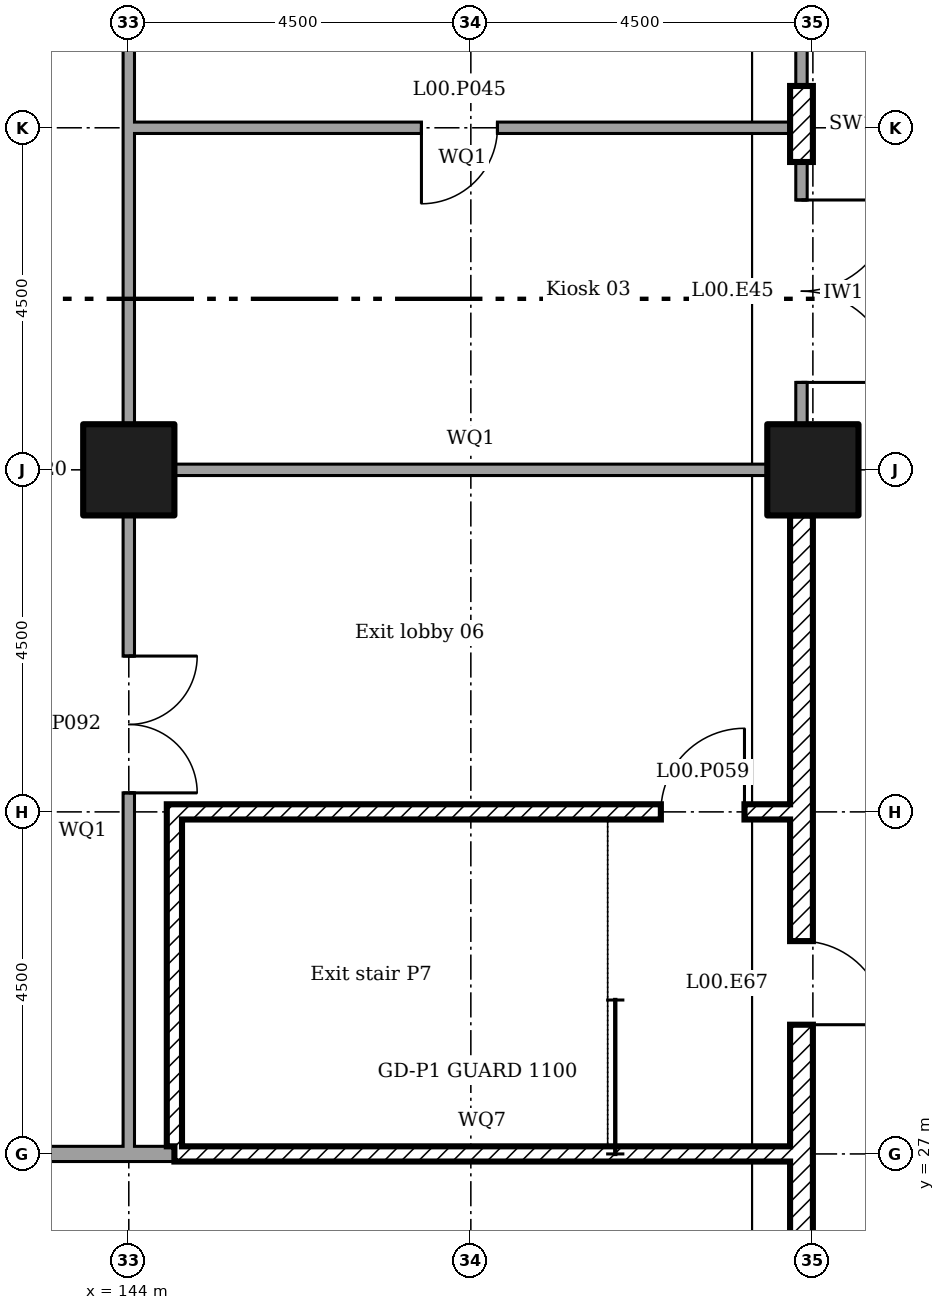
"""IFC4 building model, lengths in metres.
Left out: names, types, materials, properties, quantities, classifications, styles, units other than length and angle.
Written with IfcOpenShell. Run it as: python <this file> out.ifc"""

import sys

from ifc_helpers import new_model, si_unit, direction, frame, frame_2d, origin, origin_2d, place, context, subcontext, project, spatial, rectangle, extrude, element, fill, save


model = new_model("IFC4")
c1 = context("Model", 3, precision=1e-05, world=origin(), true_north=direction((0.0, 1.0)))
c2 = subcontext(c1, "Body", "Model", "MODEL_VIEW")
j1 = project(units=[si_unit("LENGTHUNIT", "METRE"), si_unit("PLANEANGLEUNIT", "RADIAN")], contexts=[c1])
p1 = place(None, origin())
s1 = spatial("IfcSite", under=j1, at=p1, CompositionType="ELEMENT")
p2 = place(p1, origin())
s2 = spatial("IfcBuilding", under=s1, at=p2, CompositionType="ELEMENT")
p3 = place(p2, origin())
s3 = spatial("IfcBuildingStorey", under=s2, at=p3, CompositionType="ELEMENT", Elevation=0.0)
for number, where in (
    (1, (144.0, 36.0, 0.0)),
    (2, (153.0, 36.0, 0.0)),
):
    element("IfcColumn", number, at=place(p3, frame(where)), inside=s3, PredefinedType="COLUMN", context=c2, shape_type="SweptSolid", body=[
        extrude(rectangle(XDim=1.2, YDim=1.2, at=origin_2d()), origin(), (0.0, 0.0, 1.0), 6.0),
    ])
p4 = place(p3, frame((152.85, 23.1, 0.0), z_axis=(0.0, 0.0, 1.0), x_axis=(0.0, 1.0, 0.0)))
e3 = element("IfcWall", 3, at=p4, inside=s3, PredefinedType="ELEMENTEDWALL", context=c2, shape_type="SweptSolid", body=[
    extrude(rectangle(XDim=5.1, YDim=0.3, at=frame_2d((2.55, 0.0))), origin(), (0.0, 0.0, 1.0), 5.55),
])
p5 = place(p3, frame((152.85, 28.2, 0.0), z_axis=(0.0, 0.0, 1.0), x_axis=(0.0, 1.0, 0.0)))
e4 = element("IfcWall", 4, at=p5, inside=s3, PredefinedType="ELEMENTEDWALL", context=c2, shape_type="SweptSolid", body=[
    extrude(rectangle(XDim=2.1, YDim=0.3, at=frame_2d((1.05, 0.0))), origin(), (0.0, 0.0, 1.0), 5.55),
])
p6 = place(p5, frame((0.5, 0.0, 0.0)))
e5 = element("IfcOpeningElement", 5, at=p6, cuts=e4, PredefinedType="OPENING", context=c2, shape_type="SweptSolid", body=[
    extrude(rectangle(XDim=1.1, YDim=2.4, at=frame_2d((0.55, 1.2))), frame((0.0, 0.16, 0.0), z_axis=(0.0, -1.0, 0.0), x_axis=(1.0, 0.0, 0.0)), (0.0, 0.0, 1.0), 0.32),
])
p7 = place(p3, frame((152.85, 30.3, 0.0), z_axis=(0.0, 0.0, 1.0), x_axis=(0.0, 1.0, 0.0)))
e6 = element("IfcWall", 6, at=p7, inside=s3, PredefinedType="ELEMENTEDWALL", context=c2, shape_type="SweptSolid", body=[
    extrude(rectangle(XDim=5.1, YDim=0.3, at=frame_2d((2.55, 0.0))), origin(), (0.0, 0.0, 1.0), 5.55),
])
p8 = place(p3, frame((152.85, 36.6, 0.0), z_axis=(0.0, 0.0, 1.0), x_axis=(0.0, 1.0, 0.0)))
e7 = element("IfcWall", 7, at=p8, inside=s3, PredefinedType="SOLIDWALL", context=c2, shape_type="SweptSolid", body=[
    extrude(rectangle(XDim=3.45, YDim=0.15, at=frame_2d((1.725, 0.0))), origin(), (0.0, 0.0, 1.0), 5.55),
])
p9 = place(p8, frame((0.55, 0.0, 0.0)))
e8 = element("IfcOpeningElement", 8, at=p9, cuts=e7, PredefinedType="OPENING", context=c2, shape_type="SweptSolid", body=[
    extrude(rectangle(XDim=2.4, YDim=2.7, at=frame_2d((1.2, 1.35))), frame((0.0, 0.085, 0.0), z_axis=(0.0, -1.0, 0.0), x_axis=(1.0, 0.0, 0.0)), (0.0, 0.0, 1.0), 0.17),
])
p10 = place(p3, frame((152.85, 40.05, 0.0), z_axis=(0.0, 0.0, 1.0), x_axis=(0.0, 1.0, 0.0)))
e9 = element("IfcWall", 9, at=p10, inside=s3, PredefinedType="ELEMENTEDWALL", context=c2, shape_type="SweptSolid", body=[
    extrude(rectangle(XDim=1.0, YDim=0.3, at=frame_2d((0.5, 0.0))), origin(), (0.0, 0.0, 1.0), 5.55),
])
p11 = place(p3, frame((152.85, 41.05, 0.0), z_axis=(0.0, 0.0, 1.0), x_axis=(0.0, 1.0, 0.0)))
e10 = element("IfcWall", 10, at=p11, inside=s3, PredefinedType="SOLIDWALL", context=c2, shape_type="SweptSolid", body=[
    extrude(rectangle(XDim=3.4, YDim=0.15, at=frame_2d((1.7, 0.0))), origin(), (0.0, 0.0, 1.0), 5.55),
])
p12 = place(p11, frame((0.5, 0.0, 0.0)))
e11 = element("IfcOpeningElement", 11, at=p12, cuts=e10, PredefinedType="OPENING", context=c2, shape_type="SweptSolid", body=[
    extrude(rectangle(XDim=2.4, YDim=2.7, at=frame_2d((1.2, 1.35))), frame((0.0, 0.085, 0.0), z_axis=(0.0, -1.0, 0.0), x_axis=(1.0, 0.0, 0.0)), (0.0, 0.0, 1.0), 0.17),
])
p13 = place(p3, frame((139.5, 27.0, 0.0)))
e12 = element("IfcWall", 12, at=p13, inside=s3, PredefinedType="SOLIDWALL", context=c2, shape_type="SweptSolid", body=[
    extrude(rectangle(XDim=4.575, YDim=0.2, at=frame_2d((2.288, 0.0))), origin(), (0.0, 0.0, 1.0), 5.55),
])
p14 = place(p3, frame((144.0, 27.0, 0.0)))
e13 = element("IfcWall", 13, at=p14, inside=s3, PredefinedType="SOLIDWALL", context=c2, shape_type="SweptSolid", body=[
    extrude(rectangle(XDim=0.7, YDim=0.2, at=frame_2d((0.35, 0.0))), origin(), (0.0, 0.0, 1.0), 5.55),
])
p15 = place(p3, frame((144.6, 27.0, 0.0)))
e14 = element("IfcWall", 14, at=p15, inside=s3, PredefinedType="SOLIDWALL", context=c2, shape_type="SweptSolid", body=[
    extrude(rectangle(XDim=8.1, YDim=0.2, at=frame_2d((4.05, 0.0))), origin(), (0.0, 0.0, 1.0), 5.55),
])
p16 = place(p3, frame((144.0, 27.1, 0.0), z_axis=(0.0, 0.0, 1.0), x_axis=(0.0, 1.0, 0.0)))
e15 = element("IfcWall", 15, at=p16, inside=s3, PredefinedType="PARTITIONING", context=c2, shape_type="SweptSolid", body=[
    extrude(rectangle(XDim=8.305, YDim=0.15, at=frame_2d((4.152, 0.0))), origin(), (0.0, 0.0, 1.0), 5.55),
])
p17 = place(p16, frame((4.65, 0.0, 0.0)))
e16 = element("IfcOpeningElement", 16, at=p17, cuts=e15, PredefinedType="OPENING", context=c2, shape_type="SweptSolid", body=[
    extrude(rectangle(XDim=1.8, YDim=2.1, at=frame_2d((0.9, 1.05))), frame((0.0, 0.085, 0.0), z_axis=(0.0, -1.0, 0.0), x_axis=(1.0, 0.0, 0.0)), (0.0, 0.0, 1.0), 0.17),
])
p18 = place(p3, frame((144.0, 36.595, 0.0), z_axis=(0.0, 0.0, 1.0), x_axis=(0.0, 1.0, 0.0)))
e17 = element("IfcWall", 17, at=p18, inside=s3, PredefinedType="PARTITIONING", context=c2, shape_type="SweptSolid", body=[
    extrude(rectangle(XDim=3.98, YDim=0.15, at=frame_2d((1.99, 0.0))), origin(), (0.0, 0.0, 1.0), 5.55),
])
p19 = place(p3, frame((144.0, 40.5, 0.0), z_axis=(0.0, 0.0, 1.0), x_axis=(0.0, 1.0, 0.0)))
e18 = element("IfcWall", 18, at=p19, inside=s3, PredefinedType="PARTITIONING", context=c2, shape_type="SweptSolid", body=[
    extrude(rectangle(XDim=8.405, YDim=0.15, at=frame_2d((4.203, 0.0))), origin(), (0.0, 0.0, 1.0), 5.55),
])
p20 = place(p19, frame((3.3, 0.0, 0.0)))
e19 = element("IfcOpeningElement", 19, at=p20, cuts=e18, PredefinedType="OPENING", context=c2, shape_type="SweptSolid", body=[
    extrude(rectangle(XDim=1.8, YDim=2.1, at=frame_2d((0.9, 1.05))), frame((0.0, 0.085, 0.0), z_axis=(0.0, -1.0, 0.0), x_axis=(1.0, 0.0, 0.0)), (0.0, 0.0, 1.0), 0.17),
])
p21 = place(p3, frame((144.595, 36.0, 0.0)))
e20 = element("IfcWall", 20, at=p21, inside=s3, PredefinedType="PARTITIONING", context=c2, shape_type="SweptSolid", body=[
    extrude(rectangle(XDim=7.81, YDim=0.15, at=frame_2d((3.905, 0.0))), origin(), (0.0, 0.0, 1.0), 5.55),
])
p22 = place(p3, frame((144.6, 27.1, 0.0), z_axis=(0.0, 0.0, 1.0), x_axis=(0.0, 1.0, 0.0)))
e21 = element("IfcWall", 21, at=p22, inside=s3, PredefinedType="SOLIDWALL", context=c2, shape_type="SweptSolid", body=[
    extrude(rectangle(XDim=4.5, YDim=0.2, at=frame_2d((2.25, 0.0))), origin(), (0.0, 0.0, 1.0), 5.55),
])
p23 = place(p3, frame((144.7, 31.5, 0.0)))
e22 = element("IfcWall", 22, at=p23, inside=s3, PredefinedType="SOLIDWALL", context=c2, shape_type="SweptSolid", body=[
    extrude(rectangle(XDim=8.0, YDim=0.2, at=frame_2d((4.0, 0.0))), origin(), (0.0, 0.0, 1.0), 5.55),
])
p24 = place(p23, frame((6.3, 0.0, 0.0)))
e23 = element("IfcOpeningElement", 23, at=p24, cuts=e22, PredefinedType="OPENING", context=c2, shape_type="SweptSolid", body=[
    extrude(rectangle(XDim=1.1, YDim=2.1, at=frame_2d((0.55, 1.05))), frame((0.0, 0.11, 0.0), z_axis=(0.0, -1.0, 0.0), x_axis=(1.0, 0.0, 0.0)), (0.0, 0.0, 1.0), 0.22),
])
p25 = place(p3, frame((144.075, 40.5, 0.0)))
e24 = element("IfcWall", 24, at=p25, inside=s3, PredefinedType="PARTITIONING", context=c2, shape_type="SweptSolid", body=[
    extrude(rectangle(XDim=8.625, YDim=0.15, at=frame_2d((4.312, 0.0))), origin(), (0.0, 0.0, 1.0), 5.55),
])
p26 = place(p25, frame((3.775, 0.0, 0.0)))
e25 = element("IfcOpeningElement", 25, at=p26, cuts=e24, PredefinedType="OPENING", context=c2, shape_type="SweptSolid", body=[
    extrude(rectangle(XDim=1.0, YDim=2.1, at=frame_2d((0.5, 1.05))), frame((0.0, 0.085, 0.0), z_axis=(0.0, -1.0, 0.0), x_axis=(1.0, 0.0, 0.0)), (0.0, 0.0, 1.0), 0.17),
])
p27 = place(p6, frame((1.1, 0.0, 0.0), x_axis=(-1.0, 0.0, 0.0)))
e26 = element("IfcDoor", 26, at=p27, inside=s3, OperationType="SINGLE_SWING_LEFT", PredefinedType="NOTDEFINED", context=c2, shape_type="SweptSolid", body=[
    extrude(rectangle(XDim=1.1, YDim=2.4, at=frame_2d((0.55, 1.2))), frame((0.0, 0.025, 0.0), z_axis=(0.0, -1.0, 0.0), x_axis=(1.0, 0.0, 0.0)), (0.0, 0.0, 1.0), 0.05),
])
fill(e5, e26)
p28 = place(p9, frame((2.4, 0.0, 0.0), x_axis=(-1.0, 0.0, 0.0)))
e27 = element("IfcDoor", 27, at=p28, inside=s3, OperationType="DOUBLE_DOOR_DOUBLE_SWING", PredefinedType="NOTDEFINED", context=c2, shape_type="SweptSolid", body=[
    extrude(rectangle(XDim=2.4, YDim=2.7, at=frame_2d((1.2, 1.35))), frame((0.0, 0.025, 0.0), z_axis=(0.0, -1.0, 0.0), x_axis=(1.0, 0.0, 0.0)), (0.0, 0.0, 1.0), 0.05),
])
fill(e8, e27)
p29 = place(p26, frame((1.0, 0.0, 0.0), x_axis=(-1.0, 0.0, 0.0)))
e28 = element("IfcDoor", 28, at=p29, inside=s3, OperationType="SINGLE_SWING_LEFT", PredefinedType="DOOR", context=c2, shape_type="SweptSolid", body=[
    extrude(rectangle(XDim=1.0, YDim=2.1, at=frame_2d((0.5, 1.05))), frame((0.0, 0.025, 0.0), z_axis=(0.0, -1.0, 0.0), x_axis=(1.0, 0.0, 0.0)), (0.0, 0.0, 1.0), 0.05),
])
fill(e25, e28)
p30 = place(p24, origin())
e29 = element("IfcDoor", 29, at=p30, inside=s3, OperationType="SINGLE_SWING_LEFT", PredefinedType="DOOR", context=c2, shape_type="SweptSolid", body=[
    extrude(rectangle(XDim=1.1, YDim=2.1, at=frame_2d((0.55, 1.05))), frame((0.0, 0.025, 0.0), z_axis=(0.0, -1.0, 0.0), x_axis=(1.0, 0.0, 0.0)), (0.0, 0.0, 1.0), 0.05),
])
fill(e23, e29)
p31 = place(p17, frame((1.8, 0.0, 0.0), x_axis=(-1.0, 0.0, 0.0)))
e30 = element("IfcDoor", 30, at=p31, inside=s3, OperationType="DOUBLE_DOOR_SINGLE_SWING", PredefinedType="DOOR", context=c2, shape_type="SweptSolid", body=[
    extrude(rectangle(XDim=1.8, YDim=2.1, at=frame_2d((0.9, 1.05))), frame((0.0, 0.025, 0.0), z_axis=(0.0, -1.0, 0.0), x_axis=(1.0, 0.0, 0.0)), (0.0, 0.0, 1.0), 0.05),
])
fill(e16, e30)
save(model, sys.argv[1])
